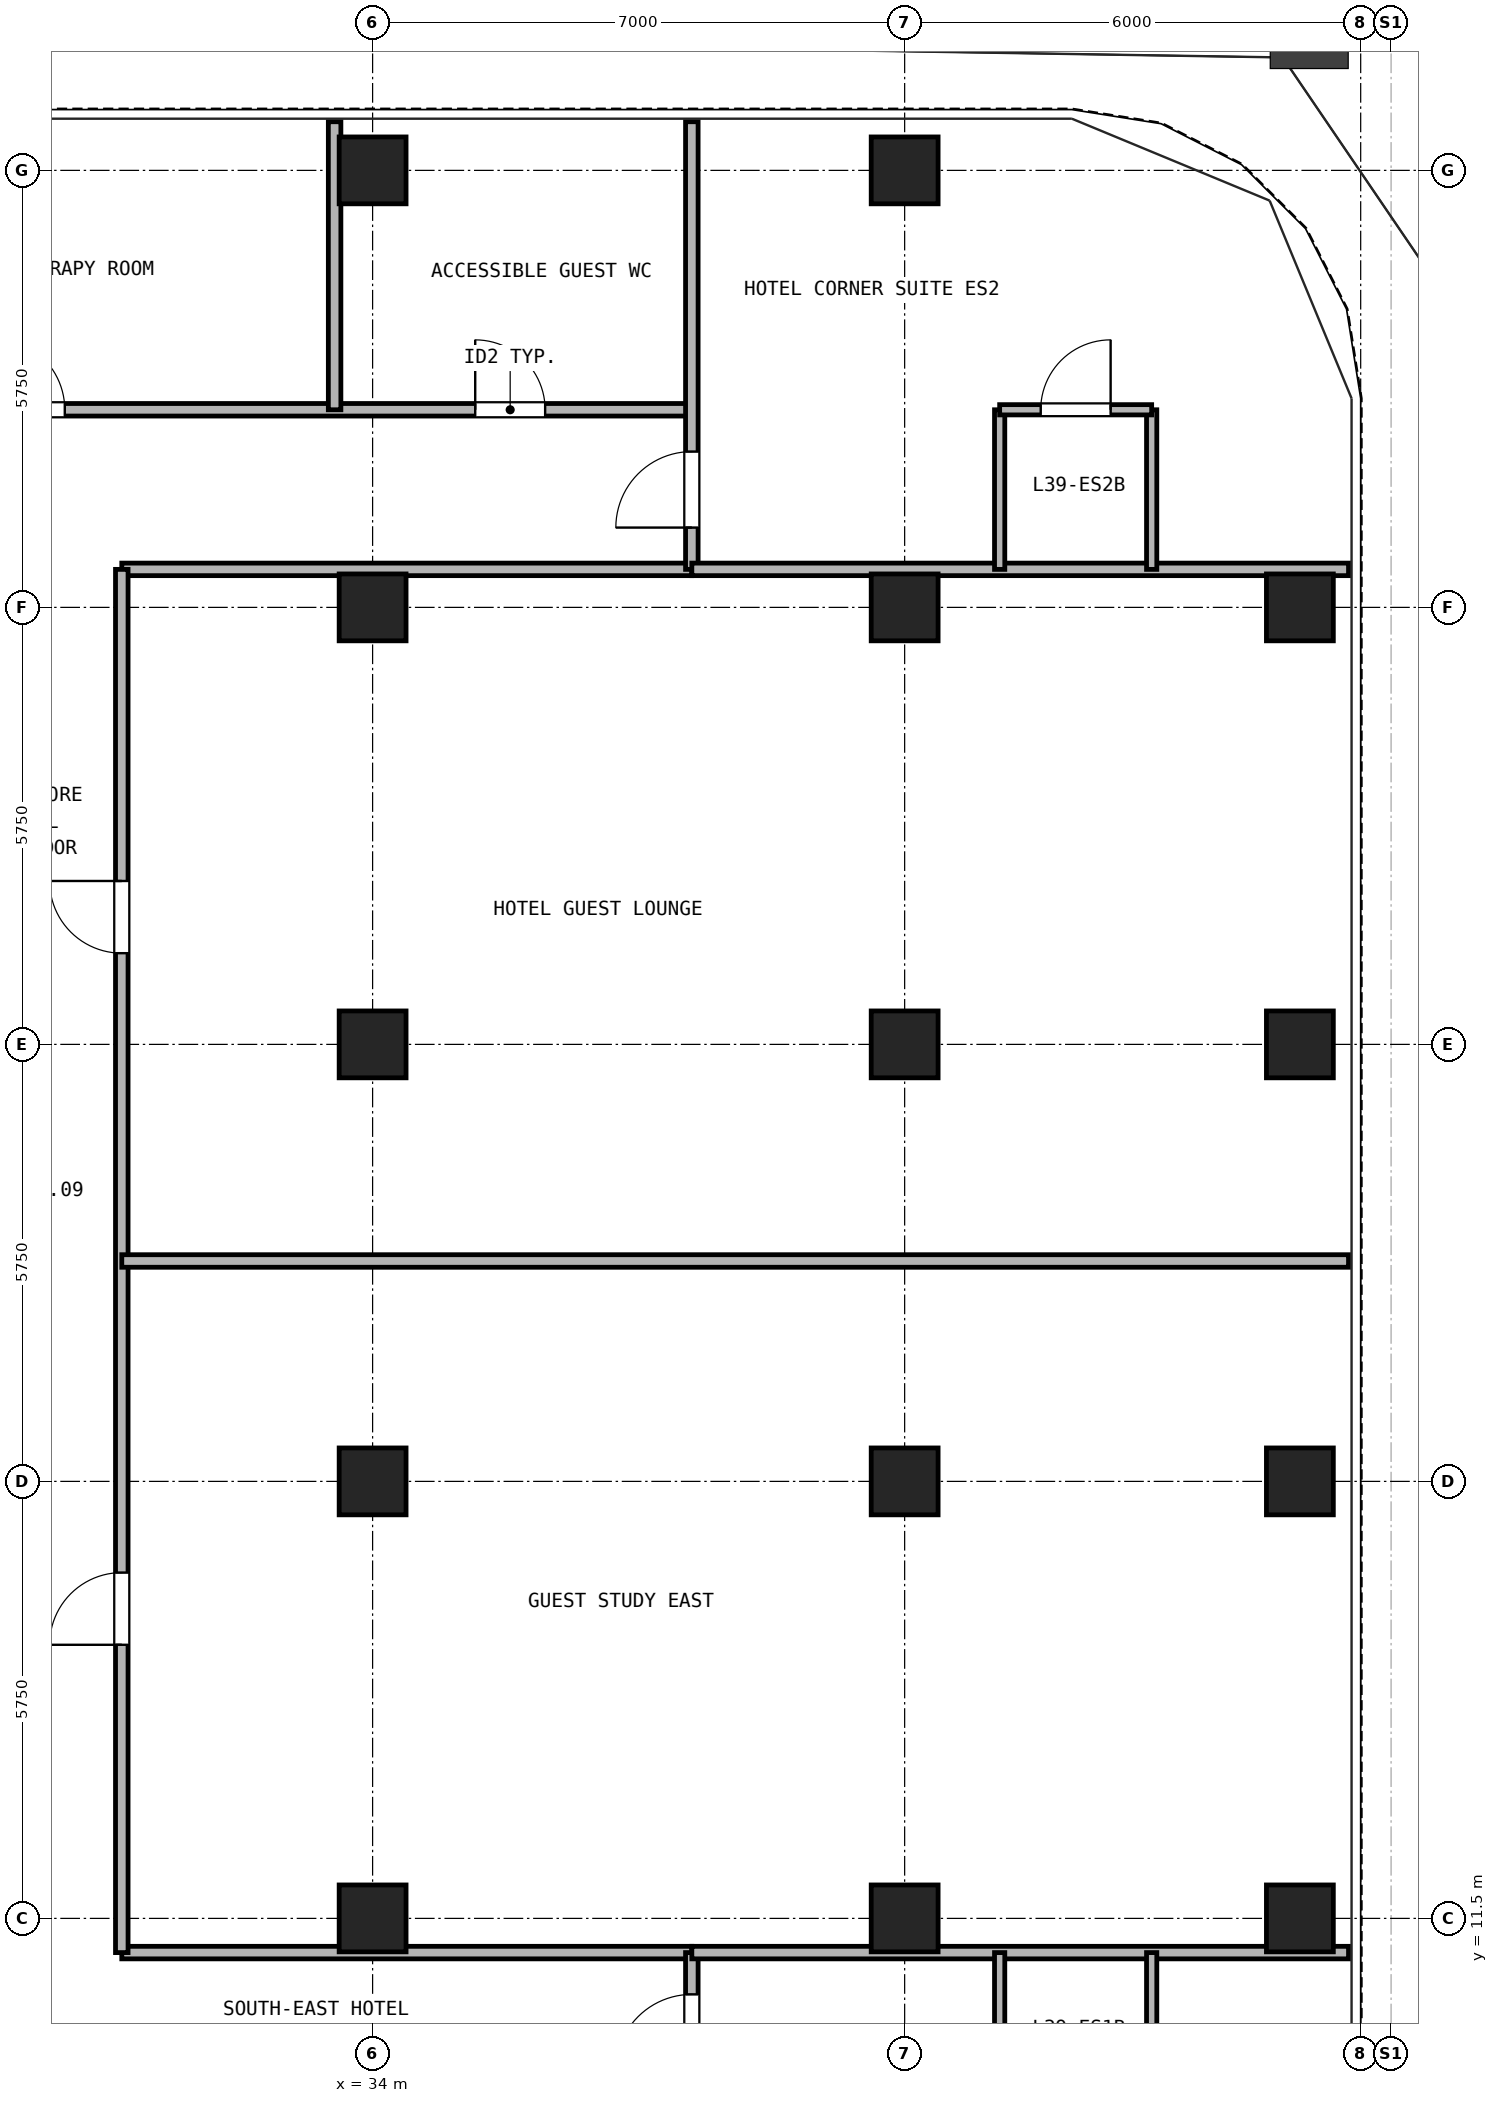
"""IFC4 building model, lengths in metres.
Left out: names, types, materials, properties, quantities, classifications, styles, units other than length and angle.
Written with IfcOpenShell. Run it as: python <this file> out.ifc"""

import sys

from ifc_helpers import new_model, si_unit, direction, frame, frame_2d, origin, origin_2d, place, context, subcontext, project, spatial, rectangle, hollow_rectangle, extrude, source, transform, mapped, element, fill, save


model = new_model("IFC4")
c1 = context("Model", 3, precision=1e-05, world=origin(), true_north=direction((0.0, 1.0)))
c2 = subcontext(c1, "Body", "Model", "MODEL_VIEW")
j1 = project(units=[si_unit("LENGTHUNIT", "METRE"), si_unit("PLANEANGLEUNIT", "RADIAN")], contexts=[c1])
p1 = place(None, origin())
s1 = spatial("IfcSite", under=j1, at=p1, CompositionType="ELEMENT")
p2 = place(p1, origin())
s2 = spatial("IfcBuilding", under=s1, at=p2, CompositionType="ELEMENT")
p3 = place(p2, frame((0.0, 0.0, 140.7)))
s3 = spatial("IfcBuildingStorey", under=s2, at=p3, CompositionType="ELEMENT", Elevation=140.7)
m1 = source(origin(), c2, "Body", "SweptSolid", [
    extrude(hollow_rectangle(XDim=0.88, YDim=0.88, WallThickness=0.05, at=origin_2d()), origin(), (0.0, 0.0, 1.0), 2.84),
])
for number, where, z_axis, x_axis in (
    (1, (34.0, 34.5, 0.0), (0.0, 0.0, 1.0), (1.0, 0.0, 0.0)),
    (2, (41.0, 34.5, 0.0), (0.0, 0.0, 1.0), (1.0, 0.0, 0.0)),
    (3, (46.2, 11.5, 0.0), (0.0, 0.0, 1.0), (1.0, 0.0, 0.0)),
    (4, (46.2, 17.25, 0.0), (0.0, 0.0, 1.0), (1.0, 0.0, 0.0)),
    (5, (46.2, 23.0, 0.0), (0.0, 0.0, 1.0), (1.0, 0.0, 0.0)),
    (6, (46.2, 28.75, 0.0), (0.0, 0.0, 1.0), (1.0, 0.0, 0.0)),
    (7, (34.0, 11.5, 0.0), (0.0, 0.0, 1.0), (1.0, 0.0, 0.0)),
    (8, (34.0, 17.25, 0.0), (0.0, 0.0, 1.0), (1.0, 0.0, 0.0)),
    (9, (34.0, 23.0, 0.0), (0.0, 0.0, 1.0), (1.0, 0.0, 0.0)),
    (10, (34.0, 28.75, 0.0), (0.0, 0.0, 1.0), (1.0, 0.0, 0.0)),
    (11, (41.0, 11.5, 0.0), (0.0, 0.0, 1.0), (1.0, 0.0, 0.0)),
    (12, (41.0, 17.25, 0.0), (0.0, 0.0, 1.0), (1.0, 0.0, 0.0)),
    (13, (41.0, 23.0, 0.0), (0.0, 0.0, 1.0), (1.0, 0.0, 0.0)),
    (14, (41.0, 28.75, 0.0), (0.0, 0.0, 1.0), (1.0, 0.0, 0.0)),
):
    element("IfcColumn", number, at=place(p3, frame(where, z_axis=z_axis, x_axis=x_axis)), inside=s3, PredefinedType="COLUMN", context=c2, shape_type="MappedRepresentation", body=[
        mapped(m1, transform((0.0, 0.0, 0.0), x_axis=(1.0, 0.0, 0.0), y_axis=(0.0, 1.0, 0.0), z_axis=(0.0, 0.0, 1.0), scale=1.0)),
    ])
p4 = place(p3, frame((8.8, 31.35, 0.0), z_axis=(0.0, 0.0, 1.0), x_axis=(1.0, 0.0, 0.0)))
e15 = element("IfcWall", 15, at=p4, inside=s3, PredefinedType="PARTITIONING", context=c2, shape_type="SweptSolid", body=[
    extrude(rectangle(XDim=29.4, YDim=0.165, at=frame_2d((14.7, 0.0))), origin(), (0.0, 0.0, 1.0), 2.84),
])
p5 = place(p4, frame((3.35, 0.0, 0.0)))
e16 = element("IfcOpeningElement", 16, at=p5, cuts=e15, PredefinedType="OPENING", context=c2, shape_type="SweptSolid", body=[
    extrude(rectangle(XDim=0.95, YDim=2.15, at=frame_2d((0.475, 1.075))), frame((0.0, 0.093, 0.0), z_axis=(0.0, -1.0, 0.0), x_axis=(1.0, 0.0, 0.0)), (0.0, 0.0, 1.0), 0.185),
])
p6 = place(p4, frame((11.7, 0.0, 0.0)))
e17 = element("IfcOpeningElement", 17, at=p6, cuts=e15, PredefinedType="OPENING", context=c2, shape_type="SweptSolid", body=[
    extrude(rectangle(XDim=0.95, YDim=2.15, at=frame_2d((0.475, 1.075))), frame((0.0, 0.093, 0.0), z_axis=(0.0, -1.0, 0.0), x_axis=(1.0, 0.0, 0.0)), (0.0, 0.0, 1.0), 0.185),
])
p7 = place(p4, frame((20.2, 0.0, 0.0)))
e18 = element("IfcOpeningElement", 18, at=p7, cuts=e15, PredefinedType="OPENING", context=c2, shape_type="SweptSolid", body=[
    extrude(rectangle(XDim=0.95, YDim=2.15, at=frame_2d((0.475, 1.075))), frame((0.0, 0.093, 0.0), z_axis=(0.0, -1.0, 0.0), x_axis=(1.0, 0.0, 0.0)), (0.0, 0.0, 1.0), 0.185),
])
p8 = place(p4, frame((26.55, 0.0, 0.0)))
e19 = element("IfcOpeningElement", 19, at=p8, cuts=e15, PredefinedType="OPENING", context=c2, shape_type="SweptSolid", body=[
    extrude(rectangle(XDim=0.92, YDim=2.1, at=frame_2d((0.46, 1.05))), frame((0.0, 0.093, 0.0), z_axis=(0.0, -1.0, 0.0), x_axis=(1.0, 0.0, 0.0)), (0.0, 0.0, 1.0), 0.185),
])
for number, where, z_axis, x_axis in (
    (20, (30.7, 11.05, 0.0), (0.0, 0.0, 1.0), (1.0, 0.0, 0.0)),
    (21, (30.7, 29.25, 0.0), (0.0, 0.0, 1.0), (1.0, 0.0, 0.0)),
):
    element("IfcWall", number, at=place(p3, frame(where, z_axis=z_axis, x_axis=x_axis)), inside=s3, PredefinedType="PARTITIONING", context=c2, shape_type="SweptSolid", body=[
        extrude(rectangle(XDim=7.5, YDim=0.165, at=frame_2d((3.75, 0.0))), origin(), (0.0, 0.0, 1.0), 2.84),
    ])
p9 = place(p3, frame((30.7, 11.05, 0.0), z_axis=(0.0, 0.0, 1.0), x_axis=(0.0, 1.0, 0.0)))
e22 = element("IfcWall", 22, at=p9, inside=s3, PredefinedType="PARTITIONING", context=c2, shape_type="SweptSolid", body=[
    extrude(rectangle(XDim=18.2, YDim=0.165, at=frame_2d((9.1, 0.0))), origin(), (0.0, 0.0, 1.0), 2.84),
])
p10 = place(p9, frame((4.05, 0.0, 0.0)))
e23 = element("IfcOpeningElement", 23, at=p10, cuts=e22, PredefinedType="OPENING", context=c2, shape_type="SweptSolid", body=[
    extrude(rectangle(XDim=0.95, YDim=2.15, at=frame_2d((0.475, 1.075))), frame((0.0, 0.093, 0.0), z_axis=(0.0, -1.0, 0.0), x_axis=(1.0, 0.0, 0.0)), (0.0, 0.0, 1.0), 0.185),
])
p11 = place(p9, frame((13.15, 0.0, 0.0)))
e24 = element("IfcOpeningElement", 24, at=p11, cuts=e22, PredefinedType="OPENING", context=c2, shape_type="SweptSolid", body=[
    extrude(rectangle(XDim=0.95, YDim=2.15, at=frame_2d((0.475, 1.075))), frame((0.0, 0.093, 0.0), z_axis=(0.0, -1.0, 0.0), x_axis=(1.0, 0.0, 0.0)), (0.0, 0.0, 1.0), 0.185),
])
p12 = place(p3, frame((38.2, 0.16, 0.0), z_axis=(0.0, 0.0, 1.0), x_axis=(0.0, 1.0, 0.0)))
e25 = element("IfcWall", 25, at=p12, inside=s3, PredefinedType="PARTITIONING", context=c2, shape_type="SweptSolid", body=[
    extrude(rectangle(XDim=10.89, YDim=0.165, at=frame_2d((5.445, 0.0))), origin(), (0.0, 0.0, 1.0), 2.84),
])
p13 = place(p12, frame((9.34, 0.0, 0.0)))
e26 = element("IfcOpeningElement", 26, at=p13, cuts=e25, PredefinedType="OPENING", context=c2, shape_type="SweptSolid", body=[
    extrude(rectangle(XDim=1.0, YDim=2.15, at=frame_2d((0.5, 1.075))), frame((0.0, 0.093, 0.0), z_axis=(0.0, -1.0, 0.0), x_axis=(1.0, 0.0, 0.0)), (0.0, 0.0, 1.0), 0.185),
])
p14 = place(p3, frame((38.2, 29.25, 0.0), z_axis=(0.0, 0.0, 1.0), x_axis=(0.0, 1.0, 0.0)))
e27 = element("IfcWall", 27, at=p14, inside=s3, PredefinedType="PARTITIONING", context=c2, shape_type="SweptSolid", body=[
    extrude(rectangle(XDim=5.89, YDim=0.165, at=frame_2d((2.945, 0.0))), origin(), (0.0, 0.0, 1.0), 2.84),
])
p15 = place(p14, frame((0.55, 0.0, 0.0)))
e28 = element("IfcOpeningElement", 28, at=p15, cuts=e27, PredefinedType="OPENING", context=c2, shape_type="SweptSolid", body=[
    extrude(rectangle(XDim=1.0, YDim=2.15, at=frame_2d((0.5, 1.075))), frame((0.0, 0.093, 0.0), z_axis=(0.0, -1.0, 0.0), x_axis=(1.0, 0.0, 0.0)), (0.0, 0.0, 1.0), 0.185),
])
for number, where, z_axis, x_axis in (
    (29, (38.2, 11.05, 0.0), (0.0, 0.0, 1.0), (1.0, 0.0, 0.0)),
    (30, (38.2, 29.25, 0.0), (0.0, 0.0, 1.0), (1.0, 0.0, 0.0)),
):
    element("IfcWall", number, at=place(p3, frame(where, z_axis=z_axis, x_axis=x_axis)), inside=s3, PredefinedType="PARTITIONING", context=c2, shape_type="SweptSolid", body=[
        extrude(rectangle(XDim=8.64, YDim=0.165, at=frame_2d((4.32, 0.0))), origin(), (0.0, 0.0, 1.0), 2.84),
    ])
for number, where, z_axis, x_axis in (
    (31, (42.25, 8.95, 0.0), (0.0, 0.0, 1.0), (0.0, 1.0, 0.0)),
    (32, (44.25, 8.95, 0.0), (0.0, 0.0, 1.0), (0.0, 1.0, 0.0)),
    (33, (42.25, 29.25, 0.0), (0.0, 0.0, 1.0), (0.0, 1.0, 0.0)),
    (34, (44.25, 29.25, 0.0), (0.0, 0.0, 1.0), (0.0, 1.0, 0.0)),
):
    element("IfcWall", number, at=place(p3, frame(where, z_axis=z_axis, x_axis=x_axis)), inside=s3, PredefinedType="PARTITIONING", context=c2, shape_type="SweptSolid", body=[
        extrude(rectangle(XDim=2.1, YDim=0.135, at=frame_2d((1.05, 0.0))), origin(), (0.0, 0.0, 1.0), 2.84),
    ])
p16 = place(p3, frame((42.25, 31.35, 0.0), z_axis=(0.0, 0.0, 1.0), x_axis=(1.0, 0.0, 0.0)))
e35 = element("IfcWall", 35, at=p16, inside=s3, PredefinedType="PARTITIONING", context=c2, shape_type="SweptSolid", body=[
    extrude(rectangle(XDim=2.0, YDim=0.135, at=frame_2d((1.0, 0.0))), origin(), (0.0, 0.0, 1.0), 2.84),
])
p17 = place(p16, frame((0.54, 0.0, 0.0)))
e36 = element("IfcOpeningElement", 36, at=p17, cuts=e35, PredefinedType="OPENING", context=c2, shape_type="SweptSolid", body=[
    extrude(rectangle(XDim=0.92, YDim=2.1, at=frame_2d((0.46, 1.05))), frame((0.0, 0.077, 0.0), z_axis=(0.0, -1.0, 0.0), x_axis=(1.0, 0.0, 0.0)), (0.0, 0.0, 1.0), 0.155),
])
p18 = place(p3, frame((33.5, 31.35, 0.0), z_axis=(0.0, 0.0, 1.0), x_axis=(0.0, 1.0, 0.0)))
e37 = element("IfcWall", 37, at=p18, inside=s3, PredefinedType="PARTITIONING", context=c2, shape_type="SweptSolid", body=[
    extrude(rectangle(XDim=3.79, YDim=0.165, at=frame_2d((1.895, 0.0))), origin(), (0.0, 0.0, 1.0), 2.84),
])
p19 = place(p3, frame((30.7, 20.15, 0.0), z_axis=(0.0, 0.0, 1.0), x_axis=(1.0, 0.0, 0.0)))
e38 = element("IfcWall", 38, at=p19, inside=s3, PredefinedType="PARTITIONING", context=c2, shape_type="SweptSolid", body=[
    extrude(rectangle(XDim=16.14, YDim=0.165, at=frame_2d((8.07, 0.0))), origin(), (0.0, 0.0, 1.0), 2.473),
])
p20 = place(p13, frame((1.0, 0.0, 0.0), z_axis=(0.0, 0.0, 1.0), x_axis=(-1.0, 0.0, 0.0)))
e39 = element("IfcDoor", 39, at=p20, inside=s3, OperationType="SINGLE_SWING_LEFT", PredefinedType="DOOR", context=c2, shape_type="SweptSolid", body=[
    extrude(rectangle(XDim=1.0, YDim=2.15, at=frame_2d((0.5, 1.075))), frame((0.0, 0.025, 0.0), z_axis=(0.0, -1.0, 0.0), x_axis=(1.0, 0.0, 0.0)), (0.0, 0.0, 1.0), 0.05),
])
fill(e26, e39)
p21 = place(p17, frame((0.92, 0.0, 0.0), z_axis=(0.0, 0.0, 1.0), x_axis=(-1.0, 0.0, 0.0)))
e40 = element("IfcDoor", 40, at=p21, inside=s3, OperationType="SINGLE_SWING_RIGHT", PredefinedType="DOOR", context=c2, shape_type="SweptSolid", body=[
    extrude(rectangle(XDim=0.92, YDim=2.1, at=frame_2d((0.46, 1.05))), frame((0.0, 0.025, 0.0), z_axis=(0.0, -1.0, 0.0), x_axis=(1.0, 0.0, 0.0)), (0.0, 0.0, 1.0), 0.05),
])
fill(e36, e40)
p22 = place(p15, frame((1.0, 0.0, 0.0), z_axis=(0.0, 0.0, 1.0), x_axis=(-1.0, 0.0, 0.0)))
e41 = element("IfcDoor", 41, at=p22, inside=s3, OperationType="SINGLE_SWING_LEFT", PredefinedType="DOOR", context=c2, shape_type="SweptSolid", body=[
    extrude(rectangle(XDim=1.0, YDim=2.15, at=frame_2d((0.5, 1.075))), frame((0.0, 0.025, 0.0), z_axis=(0.0, -1.0, 0.0), x_axis=(1.0, 0.0, 0.0)), (0.0, 0.0, 1.0), 0.05),
])
fill(e28, e41)
p23 = place(p7, origin())
e42 = element("IfcDoor", 42, at=p23, inside=s3, OperationType="SINGLE_SWING_LEFT", PredefinedType="DOOR", context=c2, shape_type="SweptSolid", body=[
    extrude(rectangle(XDim=0.95, YDim=2.15, at=frame_2d((0.475, 1.075))), frame((0.0, 0.025, 0.0), z_axis=(0.0, -1.0, 0.0), x_axis=(1.0, 0.0, 0.0)), (0.0, 0.0, 1.0), 0.05),
])
fill(e18, e42)
p24 = place(p8, origin())
e43 = element("IfcDoor", 43, at=p24, inside=s3, OperationType="SINGLE_SWING_LEFT", PredefinedType="DOOR", context=c2, shape_type="SweptSolid", body=[
    extrude(rectangle(XDim=0.92, YDim=2.1, at=frame_2d((0.46, 1.05))), frame((0.0, 0.025, 0.0), z_axis=(0.0, -1.0, 0.0), x_axis=(1.0, 0.0, 0.0)), (0.0, 0.0, 1.0), 0.05),
])
fill(e19, e43)
p25 = place(p10, origin())
e44 = element("IfcDoor", 44, at=p25, inside=s3, OperationType="SINGLE_SWING_LEFT", PredefinedType="DOOR", context=c2, shape_type="SweptSolid", body=[
    extrude(rectangle(XDim=0.95, YDim=2.15, at=frame_2d((0.475, 1.075))), frame((0.0, 0.025, 0.0), z_axis=(0.0, -1.0, 0.0), x_axis=(1.0, 0.0, 0.0)), (0.0, 0.0, 1.0), 0.05),
])
fill(e23, e44)
p26 = place(p11, origin())
e45 = element("IfcDoor", 45, at=p26, inside=s3, OperationType="SINGLE_SWING_RIGHT", PredefinedType="DOOR", context=c2, shape_type="SweptSolid", body=[
    extrude(rectangle(XDim=0.95, YDim=2.15, at=frame_2d((0.475, 1.075))), frame((0.0, 0.025, 0.0), z_axis=(0.0, -1.0, 0.0), x_axis=(1.0, 0.0, 0.0)), (0.0, 0.0, 1.0), 0.05),
])
fill(e24, e45)
save(model, sys.argv[1])
